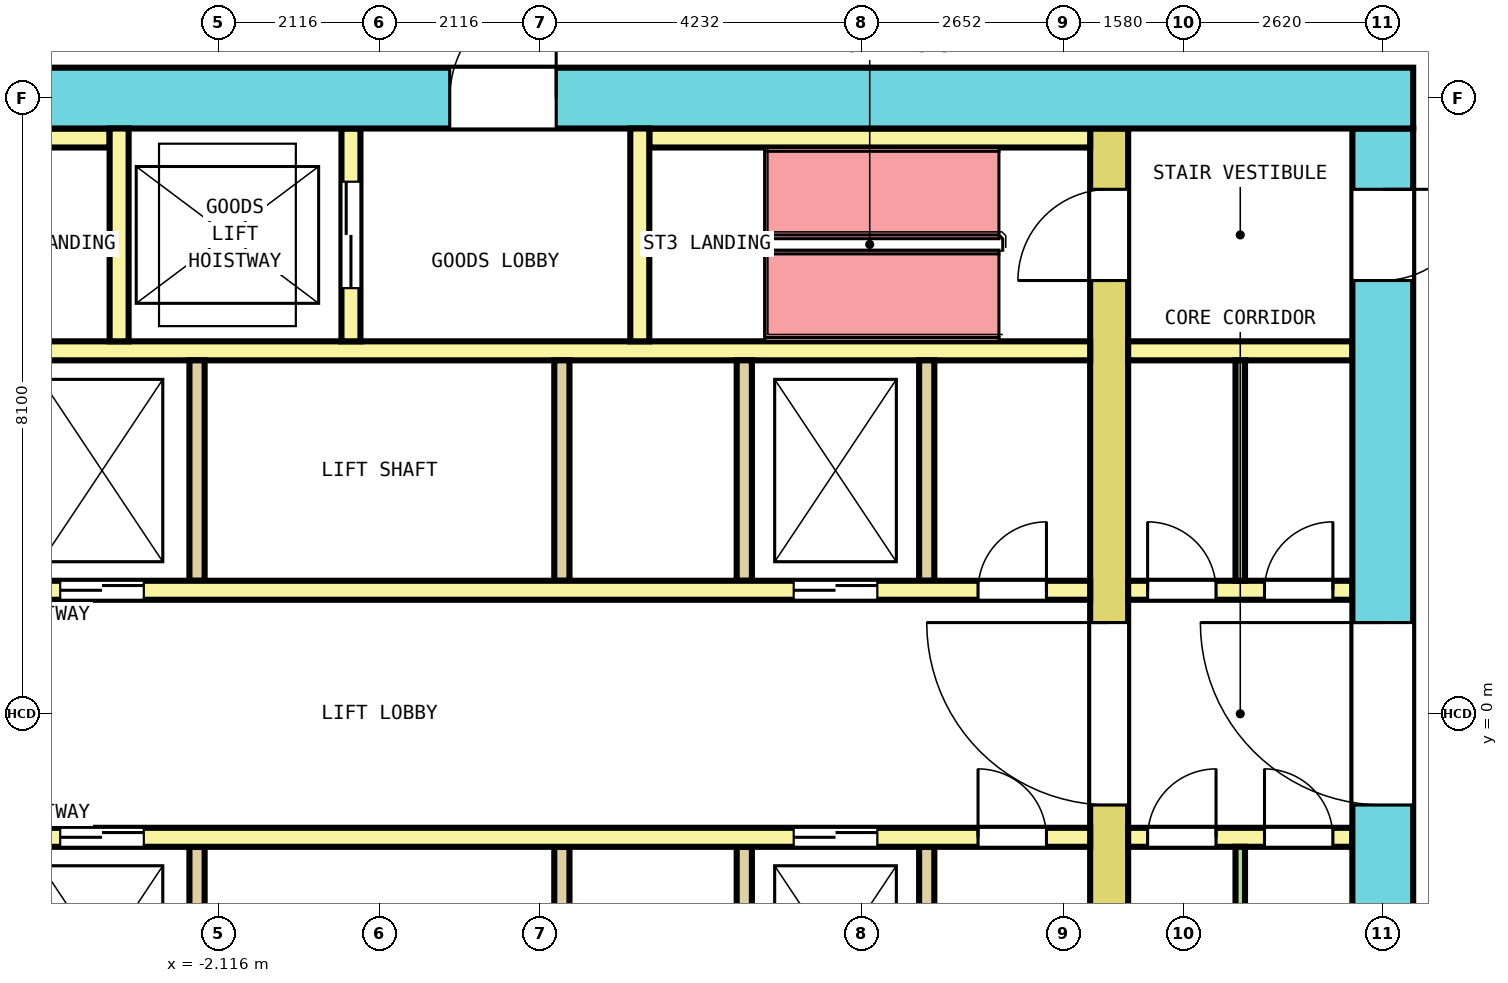
"""IFC4 building model, lengths in metres.
Left out: names, types, materials, properties, quantities, classifications, styles, units other than length and angle.
Written with IfcOpenShell. Run it as: python <this file> out.ifc"""

import sys

from ifc_helpers import new_model, si_unit, direction, frame, frame_2d, origin, place, context, subcontext, project, spatial, rectangle, extrude, element, fill, save


model = new_model("IFC4")
c1 = context("Model", 3, precision=1e-05, world=origin(), true_north=direction((0.0, 1.0)))
c2 = subcontext(c1, "Body", "Model", "MODEL_VIEW")
j1 = project(units=[si_unit("LENGTHUNIT", "METRE"), si_unit("PLANEANGLEUNIT", "RADIAN")], contexts=[c1])
p1 = place(None, origin())
s1 = spatial("IfcSite", under=j1, at=p1, CompositionType="ELEMENT")
p2 = place(p1, origin())
s2 = spatial("IfcBuilding", under=s1, at=p2, CompositionType="ELEMENT")
p3 = place(p2, frame((0.0, 0.0, 122.0)))
s3 = spatial("IfcBuildingStorey", under=s2, at=p3, CompositionType="ELEMENT", Elevation=122.0)
p4 = place(p3, frame((-13.6, 8.1, 0.0), z_axis=(0.0, 0.0, 1.0), x_axis=(1.0, 0.0, 0.0)))
e1 = element("IfcWall", 1, at=p4, inside=s3, PredefinedType="SHEAR", context=c2, shape_type="SweptSolid", body=[
    extrude(rectangle(XDim=27.2, YDim=0.8, at=frame_2d((13.6, 0.0))), origin(), (0.0, 0.0, 1.0), 4.1),
])
p5 = place(p4, frame((14.525, 0.0, 0.0)))
e2 = element("IfcOpeningElement", 2, at=p5, cuts=e1, PredefinedType="OPENING", context=c2, shape_type="SweptSolid", body=[
    extrude(rectangle(XDim=1.4, YDim=2.1, at=frame_2d((0.7, 1.05))), frame((0.0, 0.41, 0.0), z_axis=(0.0, -1.0, 0.0), x_axis=(1.0, 0.0, 0.0)), (0.0, 0.0, 1.0), 0.82),
])
p6 = place(p3, frame((13.2, -7.7, 0.0), z_axis=(0.0, 0.0, 1.0), x_axis=(0.0, 1.0, 0.0)))
e3 = element("IfcWall", 3, at=p6, inside=s3, PredefinedType="SHEAR", context=c2, shape_type="SweptSolid", body=[
    extrude(rectangle(XDim=15.4, YDim=0.8, at=frame_2d((7.7, 0.0))), origin(), (0.0, 0.0, 1.0), 4.1),
])
p7 = place(p6, frame((6.5, 0.0, 0.0)))
e4 = element("IfcOpeningElement", 4, at=p7, cuts=e3, PredefinedType="OPENING", context=c2, shape_type="SweptSolid", body=[
    extrude(rectangle(XDim=2.4, YDim=2.1, at=frame_2d((1.2, 1.05))), frame((0.0, 0.41, 0.0), z_axis=(0.0, -1.0, 0.0), x_axis=(1.0, 0.0, 0.0)), (0.0, 0.0, 1.0), 0.82),
])
p8 = place(p6, frame((13.4, 0.0, 0.0)))
e5 = element("IfcOpeningElement", 5, at=p8, cuts=e3, PredefinedType="OPENING", context=c2, shape_type="SweptSolid", body=[
    extrude(rectangle(XDim=1.2, YDim=2.1, at=frame_2d((0.6, 1.05))), frame((0.0, 0.41, 0.0), z_axis=(0.0, -1.0, 0.0), x_axis=(1.0, 0.0, 0.0)), (0.0, 0.0, 1.0), 0.82),
])
p9 = place(p6, frame((0.9, 0.0, 0.0)))
e6 = element("IfcOpeningElement", 6, at=p9, cuts=e3, PredefinedType="OPENING", context=c2, shape_type="SweptSolid", body=[
    extrude(rectangle(XDim=1.0, YDim=2.1, at=frame_2d((0.5, 1.05))), frame((0.0, 0.41, 0.0), z_axis=(0.0, -1.0, 0.0), x_axis=(1.0, 0.0, 0.0)), (0.0, 0.0, 1.0), 0.82),
])
p10 = place(p3, frame((9.6, -7.7, 0.0), z_axis=(0.0, 0.0, 1.0), x_axis=(0.0, 1.0, 0.0)))
e7 = element("IfcWall", 7, at=p10, inside=s3, PredefinedType="SHEAR", context=c2, shape_type="SweptSolid", body=[
    extrude(rectangle(XDim=15.4, YDim=0.5, at=frame_2d((7.7, 0.0))), origin(), (0.0, 0.0, 1.0), 4.1),
])
p11 = place(p10, frame((6.5, 0.0, 0.0)))
e8 = element("IfcOpeningElement", 8, at=p11, cuts=e7, PredefinedType="OPENING", context=c2, shape_type="SweptSolid", body=[
    extrude(rectangle(XDim=2.4, YDim=2.1, at=frame_2d((1.2, 1.05))), frame((0.0, 0.26, 0.0), z_axis=(0.0, -1.0, 0.0), x_axis=(1.0, 0.0, 0.0)), (0.0, 0.0, 1.0), 0.52),
])
p12 = place(p10, frame((13.4, 0.0, 0.0)))
e9 = element("IfcOpeningElement", 9, at=p12, cuts=e7, PredefinedType="OPENING", context=c2, shape_type="SweptSolid", body=[
    extrude(rectangle(XDim=1.2, YDim=2.1, at=frame_2d((0.6, 1.05))), frame((0.0, 0.26, 0.0), z_axis=(0.0, -1.0, 0.0), x_axis=(1.0, 0.0, 0.0)), (0.0, 0.0, 1.0), 0.52),
])
p13 = place(p10, frame((0.9, 0.0, 0.0)))
e10 = element("IfcOpeningElement", 10, at=p13, cuts=e7, PredefinedType="OPENING", context=c2, shape_type="SweptSolid", body=[
    extrude(rectangle(XDim=1.0, YDim=2.1, at=frame_2d((0.5, 1.05))), frame((0.0, 0.26, 0.0), z_axis=(0.0, -1.0, 0.0), x_axis=(1.0, 0.0, 0.0)), (0.0, 0.0, 1.0), 0.52),
])
p14 = place(p3, frame((-9.35, 1.625, 0.0), z_axis=(0.0, 0.0, 1.0), x_axis=(1.0, 0.0, 0.0)))
e11 = element("IfcWall", 11, at=p14, inside=s3, PredefinedType="SOLIDWALL", context=c2, shape_type="SweptSolid", body=[
    extrude(rectangle(XDim=18.7, YDim=0.25, at=frame_2d((9.35, 0.0))), origin(), (0.0, 0.0, 1.0), 4.1),
])
p15 = place(p14, frame((2.85, 0.0, 0.0)))
e12 = element("IfcOpeningElement", 12, at=p15, cuts=e11, PredefinedType="OPENING", context=c2, shape_type="SweptSolid", body=[
    extrude(rectangle(XDim=1.1, YDim=2.1, at=frame_2d((0.55, 1.05))), frame((0.0, 0.135, 0.0), z_axis=(0.0, -1.0, 0.0), x_axis=(1.0, 0.0, 0.0)), (0.0, 0.0, 1.0), 0.27),
])
p16 = place(p14, frame((5.15, 0.0, 0.0)))
e13 = element("IfcOpeningElement", 13, at=p16, cuts=e11, PredefinedType="OPENING", context=c2, shape_type="SweptSolid", body=[
    extrude(rectangle(XDim=1.1, YDim=2.1, at=frame_2d((0.55, 1.05))), frame((0.0, 0.135, 0.0), z_axis=(0.0, -1.0, 0.0), x_axis=(1.0, 0.0, 0.0)), (0.0, 0.0, 1.0), 0.27),
])
p17 = place(p14, frame((14.8, 0.0, 0.0)))
e14 = element("IfcOpeningElement", 14, at=p17, cuts=e11, PredefinedType="OPENING", context=c2, shape_type="SweptSolid", body=[
    extrude(rectangle(XDim=1.1, YDim=2.1, at=frame_2d((0.55, 1.05))), frame((0.0, 0.135, 0.0), z_axis=(0.0, -1.0, 0.0), x_axis=(1.0, 0.0, 0.0)), (0.0, 0.0, 1.0), 0.27),
])
p18 = place(p14, frame((0.575, 0.0, 0.0)))
e15 = element("IfcOpeningElement", 15, at=p18, cuts=e11, PredefinedType="OPENING", context=c2, shape_type="SweptSolid", body=[
    extrude(rectangle(XDim=0.9, YDim=2.1, at=frame_2d((0.45, 1.05))), frame((0.0, 0.135, 0.0), z_axis=(0.0, -1.0, 0.0), x_axis=(1.0, 0.0, 0.0)), (0.0, 0.0, 1.0), 0.27),
])
p19 = place(p14, frame((17.225, 0.0, 0.0)))
e16 = element("IfcOpeningElement", 16, at=p19, cuts=e11, PredefinedType="OPENING", context=c2, shape_type="SweptSolid", body=[
    extrude(rectangle(XDim=0.9, YDim=2.1, at=frame_2d((0.45, 1.05))), frame((0.0, 0.135, 0.0), z_axis=(0.0, -1.0, 0.0), x_axis=(1.0, 0.0, 0.0)), (0.0, 0.0, 1.0), 0.27),
])
p20 = place(p3, frame((9.85, 1.625, 0.0), z_axis=(0.0, 0.0, 1.0), x_axis=(1.0, 0.0, 0.0)))
e17 = element("IfcWall", 17, at=p20, inside=s3, PredefinedType="SOLIDWALL", context=c2, shape_type="SweptSolid", body=[
    extrude(rectangle(XDim=2.95, YDim=0.25, at=frame_2d((1.475, 0.0))), origin(), (0.0, 0.0, 1.0), 4.1),
])
p21 = place(p20, frame((0.256, 0.0, 0.0)))
e18 = element("IfcOpeningElement", 18, at=p21, cuts=e17, PredefinedType="OPENING", context=c2, shape_type="SweptSolid", body=[
    extrude(rectangle(XDim=0.9, YDim=2.1, at=frame_2d((0.45, 1.05))), frame((0.0, 0.135, 0.0), z_axis=(0.0, -1.0, 0.0), x_axis=(1.0, 0.0, 0.0)), (0.0, 0.0, 1.0), 0.27),
])
p22 = place(p20, frame((1.794, 0.0, 0.0)))
e19 = element("IfcOpeningElement", 19, at=p22, cuts=e17, PredefinedType="OPENING", context=c2, shape_type="SweptSolid", body=[
    extrude(rectangle(XDim=0.9, YDim=2.1, at=frame_2d((0.45, 1.05))), frame((0.0, 0.135, 0.0), z_axis=(0.0, -1.0, 0.0), x_axis=(1.0, 0.0, 0.0)), (0.0, 0.0, 1.0), 0.27),
])
p23 = place(p3, frame((-9.35, 4.775, 0.0), z_axis=(0.0, 0.0, 1.0), x_axis=(1.0, 0.0, 0.0)))
e20 = element("IfcWall", 20, at=p23, inside=s3, PredefinedType="SOLIDWALL", context=c2, shape_type="SweptSolid", body=[
    extrude(rectangle(XDim=18.7, YDim=0.25, at=frame_2d((9.35, 0.0))), origin(), (0.0, 0.0, 1.0), 4.1),
])
p24 = place(p3, frame((9.85, 4.775, 0.0), z_axis=(0.0, 0.0, 1.0), x_axis=(1.0, 0.0, 0.0)))
e21 = element("IfcWall", 21, at=p24, inside=s3, PredefinedType="SOLIDWALL", context=c2, shape_type="SweptSolid", body=[
    extrude(rectangle(XDim=2.95, YDim=0.25, at=frame_2d((1.475, 0.0))), origin(), (0.0, 0.0, 1.0), 4.1),
])
for number, where, z_axis, x_axis in (
    (22, (-2.4, 1.75, 0.0), (0.0, 0.0, 1.0), (0.0, 1.0, 0.0)),
    (23, (2.4, 1.75, 0.0), (0.0, 0.0, 1.0), (0.0, 1.0, 0.0)),
    (24, (4.8, 1.75, 0.0), (0.0, 0.0, 1.0), (0.0, 1.0, 0.0)),
    (25, (7.2, 1.75, 0.0), (0.0, 0.0, 1.0), (0.0, 1.0, 0.0)),
):
    element("IfcWall", number, at=place(p3, frame(where, z_axis=z_axis, x_axis=x_axis)), inside=s3, PredefinedType="SOLIDWALL", context=c2, shape_type="SweptSolid", body=[
        extrude(rectangle(XDim=2.9, YDim=0.2, at=frame_2d((1.45, 0.0))), origin(), (0.0, 0.0, 1.0), 4.1),
    ])
p25 = place(p3, frame((-9.35, -1.625, 0.0), z_axis=(0.0, 0.0, 1.0), x_axis=(1.0, 0.0, 0.0)))
e26 = element("IfcWall", 26, at=p25, inside=s3, PredefinedType="SOLIDWALL", context=c2, shape_type="SweptSolid", body=[
    extrude(rectangle(XDim=18.7, YDim=0.25, at=frame_2d((9.35, 0.0))), origin(), (0.0, 0.0, 1.0), 4.1),
])
p26 = place(p25, frame((2.85, 0.0, 0.0)))
e27 = element("IfcOpeningElement", 27, at=p26, cuts=e26, PredefinedType="OPENING", context=c2, shape_type="SweptSolid", body=[
    extrude(rectangle(XDim=1.1, YDim=2.1, at=frame_2d((0.55, 1.05))), frame((0.0, 0.135, 0.0), z_axis=(0.0, -1.0, 0.0), x_axis=(1.0, 0.0, 0.0)), (0.0, 0.0, 1.0), 0.27),
])
p27 = place(p25, frame((5.15, 0.0, 0.0)))
e28 = element("IfcOpeningElement", 28, at=p27, cuts=e26, PredefinedType="OPENING", context=c2, shape_type="SweptSolid", body=[
    extrude(rectangle(XDim=1.1, YDim=2.1, at=frame_2d((0.55, 1.05))), frame((0.0, 0.135, 0.0), z_axis=(0.0, -1.0, 0.0), x_axis=(1.0, 0.0, 0.0)), (0.0, 0.0, 1.0), 0.27),
])
p28 = place(p25, frame((14.8, 0.0, 0.0)))
e29 = element("IfcOpeningElement", 29, at=p28, cuts=e26, PredefinedType="OPENING", context=c2, shape_type="SweptSolid", body=[
    extrude(rectangle(XDim=1.1, YDim=2.1, at=frame_2d((0.55, 1.05))), frame((0.0, 0.135, 0.0), z_axis=(0.0, -1.0, 0.0), x_axis=(1.0, 0.0, 0.0)), (0.0, 0.0, 1.0), 0.27),
])
p29 = place(p25, frame((0.575, 0.0, 0.0)))
e30 = element("IfcOpeningElement", 30, at=p29, cuts=e26, PredefinedType="OPENING", context=c2, shape_type="SweptSolid", body=[
    extrude(rectangle(XDim=0.9, YDim=2.1, at=frame_2d((0.45, 1.05))), frame((0.0, 0.135, 0.0), z_axis=(0.0, -1.0, 0.0), x_axis=(1.0, 0.0, 0.0)), (0.0, 0.0, 1.0), 0.27),
])
p30 = place(p25, frame((17.225, 0.0, 0.0)))
e31 = element("IfcOpeningElement", 31, at=p30, cuts=e26, PredefinedType="OPENING", context=c2, shape_type="SweptSolid", body=[
    extrude(rectangle(XDim=0.9, YDim=2.1, at=frame_2d((0.45, 1.05))), frame((0.0, 0.135, 0.0), z_axis=(0.0, -1.0, 0.0), x_axis=(1.0, 0.0, 0.0)), (0.0, 0.0, 1.0), 0.27),
])
p31 = place(p3, frame((9.85, -1.625, 0.0), z_axis=(0.0, 0.0, 1.0), x_axis=(1.0, 0.0, 0.0)))
e32 = element("IfcWall", 32, at=p31, inside=s3, PredefinedType="SOLIDWALL", context=c2, shape_type="SweptSolid", body=[
    extrude(rectangle(XDim=2.95, YDim=0.25, at=frame_2d((1.475, 0.0))), origin(), (0.0, 0.0, 1.0), 4.1),
])
p32 = place(p31, frame((0.256, 0.0, 0.0)))
e33 = element("IfcOpeningElement", 33, at=p32, cuts=e32, PredefinedType="OPENING", context=c2, shape_type="SweptSolid", body=[
    extrude(rectangle(XDim=0.9, YDim=2.1, at=frame_2d((0.45, 1.05))), frame((0.0, 0.135, 0.0), z_axis=(0.0, -1.0, 0.0), x_axis=(1.0, 0.0, 0.0)), (0.0, 0.0, 1.0), 0.27),
])
p33 = place(p31, frame((1.794, 0.0, 0.0)))
e34 = element("IfcOpeningElement", 34, at=p33, cuts=e32, PredefinedType="OPENING", context=c2, shape_type="SweptSolid", body=[
    extrude(rectangle(XDim=0.9, YDim=2.1, at=frame_2d((0.45, 1.05))), frame((0.0, 0.135, 0.0), z_axis=(0.0, -1.0, 0.0), x_axis=(1.0, 0.0, 0.0)), (0.0, 0.0, 1.0), 0.27),
])
for number, where, z_axis, x_axis in (
    (35, (-2.4, -4.65, 0.0), (0.0, 0.0, 1.0), (0.0, 1.0, 0.0)),
    (36, (2.4, -4.65, 0.0), (0.0, 0.0, 1.0), (0.0, 1.0, 0.0)),
    (37, (4.8, -4.65, 0.0), (0.0, 0.0, 1.0), (0.0, 1.0, 0.0)),
    (38, (7.2, -4.65, 0.0), (0.0, 0.0, 1.0), (0.0, 1.0, 0.0)),
):
    element("IfcWall", number, at=place(p3, frame(where, z_axis=z_axis, x_axis=x_axis)), inside=s3, PredefinedType="SOLIDWALL", context=c2, shape_type="SweptSolid", body=[
        extrude(rectangle(XDim=2.9, YDim=0.2, at=frame_2d((1.45, 0.0))), origin(), (0.0, 0.0, 1.0), 4.1),
    ])
for number, where, z_axis, x_axis in (
    (39, (-9.35, 7.575, 0.0), (0.0, 0.0, 1.0), (1.0, 0.0, 0.0)),
    (40, (3.55, 7.575, 0.0), (0.0, 0.0, 1.0), (1.0, 0.0, 0.0)),
):
    element("IfcWall", number, at=place(p3, frame(where, z_axis=z_axis, x_axis=x_axis)), inside=s3, PredefinedType="SOLIDWALL", context=c2, shape_type="SweptSolid", body=[
        extrude(rectangle(XDim=5.8, YDim=0.25, at=frame_2d((2.9, 0.0))), origin(), (0.0, 0.0, 1.0), 4.1),
    ])
p34 = place(p3, frame((-3.425, 4.9, 0.0), z_axis=(0.0, 0.0, 1.0), x_axis=(0.0, 1.0, 0.0)))
e41 = element("IfcWall", 41, at=p34, inside=s3, PredefinedType="SOLIDWALL", context=c2, shape_type="SweptSolid", body=[
    extrude(rectangle(XDim=2.8, YDim=0.25, at=frame_2d((1.4, 0.0))), origin(), (0.0, 0.0, 1.0), 4.1),
])
p35 = place(p3, frame((-0.375, 4.9, 0.0), z_axis=(0.0, 0.0, 1.0), x_axis=(0.0, 1.0, 0.0)))
e42 = element("IfcWall", 42, at=p35, inside=s3, PredefinedType="SOLIDWALL", context=c2, shape_type="SweptSolid", body=[
    extrude(rectangle(XDim=2.8, YDim=0.25, at=frame_2d((1.4, 0.0))), origin(), (0.0, 0.0, 1.0), 4.1),
])
p36 = place(p35, frame((0.7, 0.0, 0.0)))
e43 = element("IfcOpeningElement", 43, at=p36, cuts=e42, PredefinedType="OPENING", context=c2, shape_type="SweptSolid", body=[
    extrude(rectangle(XDim=1.4, YDim=2.1, at=frame_2d((0.7, 1.05))), frame((0.0, 0.135, 0.0), z_axis=(0.0, -1.0, 0.0), x_axis=(1.0, 0.0, 0.0)), (0.0, 0.0, 1.0), 0.27),
])
p37 = place(p3, frame((3.425, 4.9, 0.0), z_axis=(0.0, 0.0, 1.0), x_axis=(0.0, 1.0, 0.0)))
e44 = element("IfcWall", 44, at=p37, inside=s3, PredefinedType="SOLIDWALL", context=c2, shape_type="SweptSolid", body=[
    extrude(rectangle(XDim=2.8, YDim=0.25, at=frame_2d((1.4, 0.0))), origin(), (0.0, 0.0, 1.0), 4.1),
])
for number, where, z_axis, x_axis in (
    (45, (11.325, 1.75, 0.0), (0.0, 0.0, 1.0), (0.0, 1.0, 0.0)),
    (46, (11.325, -4.65, 0.0), (0.0, 0.0, 1.0), (0.0, 1.0, 0.0)),
):
    element("IfcWall", number, at=place(p3, frame(where, z_axis=z_axis, x_axis=x_axis)), inside=s3, PredefinedType="PARTITIONING", context=c2, shape_type="SweptSolid", body=[
        extrude(rectangle(XDim=2.9, YDim=0.125, at=frame_2d((1.45, 0.0))), origin(), (0.0, 0.0, 1.0), 4.1),
    ])
p38 = place(p16, origin())
e47 = element("IfcDoor", 47, at=p38, inside=s3, OperationType="DOUBLE_DOOR_SLIDING", PredefinedType="DOOR", context=c2, shape_type="SweptSolid", body=[
    extrude(rectangle(XDim=1.1, YDim=2.1, at=frame_2d((0.55, 1.05))), frame((0.0, 0.075, 0.0), z_axis=(0.0, -1.0, 0.0), x_axis=(1.0, 0.0, 0.0)), (0.0, 0.0, 1.0), 0.15),
])
fill(e13, e47)
p39 = place(p17, origin())
e48 = element("IfcDoor", 48, at=p39, inside=s3, OperationType="DOUBLE_DOOR_SLIDING", PredefinedType="DOOR", context=c2, shape_type="SweptSolid", body=[
    extrude(rectangle(XDim=1.1, YDim=2.1, at=frame_2d((0.55, 1.05))), frame((0.0, 0.075, 0.0), z_axis=(0.0, -1.0, 0.0), x_axis=(1.0, 0.0, 0.0)), (0.0, 0.0, 1.0), 0.15),
])
fill(e14, e48)
p40 = place(p27, origin())
e49 = element("IfcDoor", 49, at=p40, inside=s3, OperationType="DOUBLE_DOOR_SLIDING", PredefinedType="DOOR", context=c2, shape_type="SweptSolid", body=[
    extrude(rectangle(XDim=1.1, YDim=2.1, at=frame_2d((0.55, 1.05))), frame((0.0, 0.075, 0.0), z_axis=(0.0, -1.0, 0.0), x_axis=(1.0, 0.0, 0.0)), (0.0, 0.0, 1.0), 0.15),
])
fill(e28, e49)
p41 = place(p28, origin())
e50 = element("IfcDoor", 50, at=p41, inside=s3, OperationType="DOUBLE_DOOR_SLIDING", PredefinedType="DOOR", context=c2, shape_type="SweptSolid", body=[
    extrude(rectangle(XDim=1.1, YDim=2.1, at=frame_2d((0.55, 1.05))), frame((0.0, 0.075, 0.0), z_axis=(0.0, -1.0, 0.0), x_axis=(1.0, 0.0, 0.0)), (0.0, 0.0, 1.0), 0.15),
])
fill(e29, e50)
p42 = place(p36, origin())
e51 = element("IfcDoor", 51, at=p42, inside=s3, OperationType="DOUBLE_DOOR_SLIDING", PredefinedType="DOOR", context=c2, shape_type="SweptSolid", body=[
    extrude(rectangle(XDim=1.4, YDim=2.1, at=frame_2d((0.7, 1.05))), frame((0.0, 0.075, 0.0), z_axis=(0.0, -1.0, 0.0), x_axis=(1.0, 0.0, 0.0)), (0.0, 0.0, 1.0), 0.15),
])
fill(e43, e51)
p43 = place(p11, origin())
e52 = element("IfcDoor", 52, at=p43, inside=s3, OperationType="DOUBLE_DOOR_SINGLE_SWING", PredefinedType="DOOR", context=c2, shape_type="SweptSolid", body=[
    extrude(rectangle(XDim=2.4, YDim=2.1, at=frame_2d((1.2, 1.05))), frame((0.0, 0.2, 0.0), z_axis=(0.0, -1.0, 0.0), x_axis=(1.0, 0.0, 0.0)), (0.0, 0.0, 1.0), 0.4),
])
fill(e8, e52)
p44 = place(p7, origin())
e53 = element("IfcDoor", 53, at=p44, inside=s3, OperationType="DOUBLE_DOOR_SINGLE_SWING", PredefinedType="DOOR", context=c2, shape_type="SweptSolid", body=[
    extrude(rectangle(XDim=2.4, YDim=2.1, at=frame_2d((1.2, 1.05))), frame((0.0, 0.3, 0.0), z_axis=(0.0, -1.0, 0.0), x_axis=(1.0, 0.0, 0.0)), (0.0, 0.0, 1.0), 0.6),
])
fill(e4, e53)
p45 = place(p12, origin())
e54 = element("IfcDoor", 54, at=p45, inside=s3, OperationType="SINGLE_SWING_RIGHT", PredefinedType="DOOR", context=c2, shape_type="SweptSolid", body=[
    extrude(rectangle(XDim=1.2, YDim=2.1, at=frame_2d((0.6, 1.05))), frame((0.0, 0.2, 0.0), z_axis=(0.0, -1.0, 0.0), x_axis=(1.0, 0.0, 0.0)), (0.0, 0.0, 1.0), 0.4),
])
fill(e9, e54)
p46 = place(p8, origin())
e55 = element("IfcDoor", 55, at=p46, inside=s3, OperationType="SINGLE_SWING_LEFT", PredefinedType="DOOR", context=c2, shape_type="SweptSolid", body=[
    extrude(rectangle(XDim=1.2, YDim=2.1, at=frame_2d((0.6, 1.05))), frame((0.0, 0.3, 0.0), z_axis=(0.0, -1.0, 0.0), x_axis=(1.0, 0.0, 0.0)), (0.0, 0.0, 1.0), 0.6),
])
fill(e5, e55)
p47 = place(p5, origin())
e56 = element("IfcDoor", 56, at=p47, inside=s3, OperationType="DOUBLE_DOOR_SINGLE_SWING", PredefinedType="DOOR", context=c2, shape_type="SweptSolid", body=[
    extrude(rectangle(XDim=1.4, YDim=2.1, at=frame_2d((0.7, 1.05))), frame((0.0, 0.3, 0.0), z_axis=(0.0, -1.0, 0.0), x_axis=(1.0, 0.0, 0.0)), (0.0, 0.0, 1.0), 0.6),
])
fill(e2, e56)
p48 = place(p19, origin())
e57 = element("IfcDoor", 57, at=p48, inside=s3, OperationType="SINGLE_SWING_LEFT", PredefinedType="DOOR", context=c2, shape_type="SweptSolid", body=[
    extrude(rectangle(XDim=0.9, YDim=2.1, at=frame_2d((0.45, 1.05))), frame((0.0, 0.075, 0.0), z_axis=(0.0, -1.0, 0.0), x_axis=(1.0, 0.0, 0.0)), (0.0, 0.0, 1.0), 0.15),
])
fill(e16, e57)
p49 = place(p21, origin())
e58 = element("IfcDoor", 58, at=p49, inside=s3, OperationType="SINGLE_SWING_RIGHT", PredefinedType="DOOR", context=c2, shape_type="SweptSolid", body=[
    extrude(rectangle(XDim=0.9, YDim=2.1, at=frame_2d((0.45, 1.05))), frame((0.0, 0.075, 0.0), z_axis=(0.0, -1.0, 0.0), x_axis=(1.0, 0.0, 0.0)), (0.0, 0.0, 1.0), 0.15),
])
fill(e18, e58)
p50 = place(p22, origin())
e59 = element("IfcDoor", 59, at=p50, inside=s3, OperationType="SINGLE_SWING_LEFT", PredefinedType="DOOR", context=c2, shape_type="SweptSolid", body=[
    extrude(rectangle(XDim=0.9, YDim=2.1, at=frame_2d((0.45, 1.05))), frame((0.0, 0.075, 0.0), z_axis=(0.0, -1.0, 0.0), x_axis=(1.0, 0.0, 0.0)), (0.0, 0.0, 1.0), 0.15),
])
fill(e19, e59)
p51 = place(p30, origin())
e60 = element("IfcDoor", 60, at=p51, inside=s3, OperationType="SINGLE_SWING_LEFT", PredefinedType="DOOR", context=c2, shape_type="SweptSolid", body=[
    extrude(rectangle(XDim=0.9, YDim=2.1, at=frame_2d((0.45, 1.05))), frame((0.0, 0.075, 0.0), z_axis=(0.0, -1.0, 0.0), x_axis=(1.0, 0.0, 0.0)), (0.0, 0.0, 1.0), 0.15),
])
fill(e31, e60)
p52 = place(p32, origin())
e61 = element("IfcDoor", 61, at=p52, inside=s3, OperationType="SINGLE_SWING_RIGHT", PredefinedType="DOOR", context=c2, shape_type="SweptSolid", body=[
    extrude(rectangle(XDim=0.9, YDim=2.1, at=frame_2d((0.45, 1.05))), frame((0.0, 0.075, 0.0), z_axis=(0.0, -1.0, 0.0), x_axis=(1.0, 0.0, 0.0)), (0.0, 0.0, 1.0), 0.15),
])
fill(e33, e61)
p53 = place(p33, origin())
e62 = element("IfcDoor", 62, at=p53, inside=s3, OperationType="SINGLE_SWING_LEFT", PredefinedType="DOOR", context=c2, shape_type="SweptSolid", body=[
    extrude(rectangle(XDim=0.9, YDim=2.1, at=frame_2d((0.45, 1.05))), frame((0.0, 0.075, 0.0), z_axis=(0.0, -1.0, 0.0), x_axis=(1.0, 0.0, 0.0)), (0.0, 0.0, 1.0), 0.15),
])
fill(e34, e62)
save(model, sys.argv[1])
